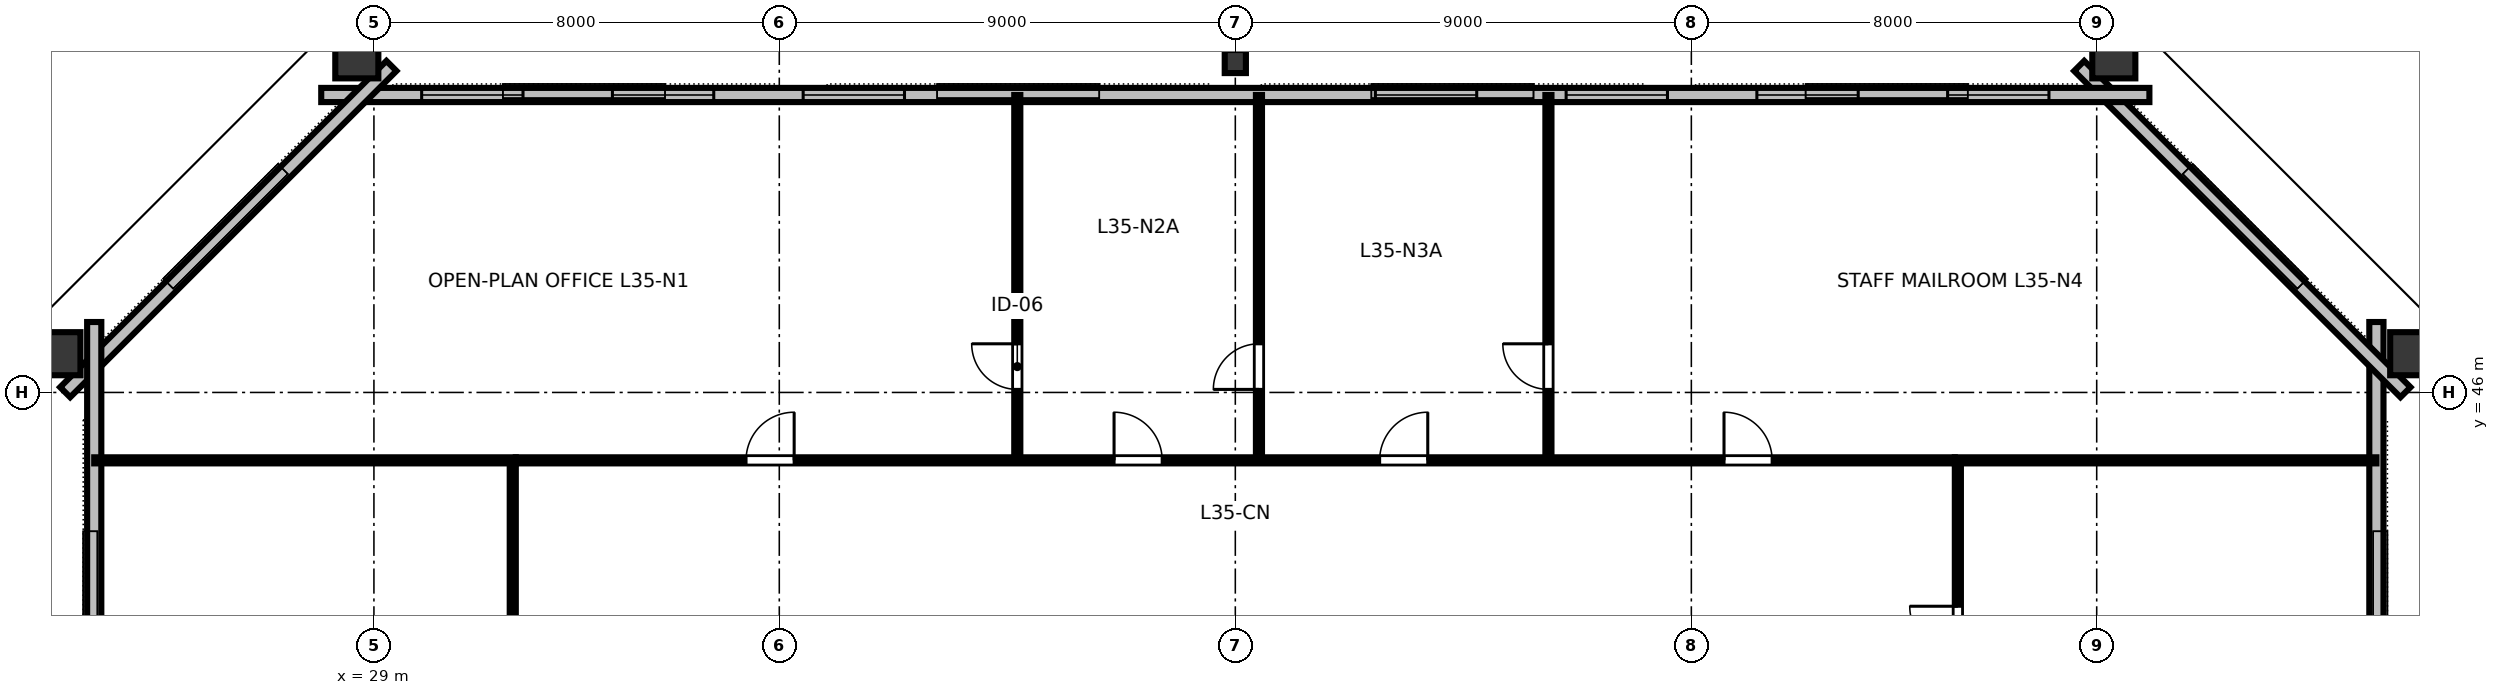
"""IFC4 building model, lengths in metres.
Left out: names, types, materials, properties, quantities, classifications, styles, units other than length and angle.
Written with IfcOpenShell. Run it as: python <this file> out.ifc"""

import sys

from ifc_helpers import new_model, si_unit, direction, frame, frame_2d, origin, origin_2d, place, context, subcontext, project, spatial, rectangle, hollow_rectangle, i_section, extrude, element, fill, save


model = new_model("IFC4")
c1 = context("Model", 3, precision=1e-05, world=origin(), true_north=direction((0.0, 1.0)))
c2 = subcontext(c1, "Body", "Model", "MODEL_VIEW")
j1 = project(units=[si_unit("LENGTHUNIT", "METRE"), si_unit("PLANEANGLEUNIT", "RADIAN")], contexts=[c1])
p1 = place(None, origin())
s1 = spatial("IfcSite", under=j1, at=p1, CompositionType="ELEMENT")
p2 = place(p1, origin())
s2 = spatial("IfcBuilding", under=s1, at=p2, CompositionType="ELEMENT")
p3 = place(p2, frame((0.0, 0.0, 134.8)))
s3 = spatial("IfcBuildingStorey", under=s2, at=p3, CompositionType="ELEMENT", Elevation=134.8)
p4 = place(p3, frame((69.292, 46.764, 0.0), z_axis=(0.088696892927, 0.044710179306, 0.995054702542), x_axis=(-0.88854975077, -0.447898650878, 0.099328439777)))
e1 = element("IfcColumn", 1, at=p4, inside=s3, PredefinedType="COLUMN", context=c2, shape_type="SweptSolid", body=[
    extrude(hollow_rectangle(XDim=0.85, YDim=1.0, WallThickness=0.05, at=origin_2d()), origin(), (0.0, 0.0, 1.0), 3.375),
])
p5 = place(p3, frame((63.338, 52.698, 0.0), z_axis=(0.059349667623, 0.074114706886, 0.995482107914), x_axis=(-0.780571247111, 0.625066818975, 0.0)))
e2 = element("IfcColumn", 2, at=p5, inside=s3, PredefinedType="COLUMN", context=c2, shape_type="SweptSolid", body=[
    extrude(hollow_rectangle(XDim=0.85, YDim=1.0, WallThickness=0.05, at=origin_2d()), origin(), (0.0, 0.0, 1.0), 3.373),
])
p6 = place(p3, frame((46.0, 52.53, 0.0), z_axis=(0.0, 0.074245582927, 0.997239987874), x_axis=(-1.0, 0.0, 0.0)))
e3 = element("IfcColumn", 3, at=p6, inside=s3, PredefinedType="COLUMN", context=c2, shape_type="SweptSolid", body=[
    extrude(i_section(OverallWidth=0.418, OverallDepth=0.455, WebThickness=0.042, FlangeThickness=0.068, FilletRadius=0.025, at=origin_2d()), origin(), (0.0, 0.0, 1.0), 3.367),
])
p7 = place(p3, frame((28.662, 52.698, 0.0), z_axis=(-0.059349667623, 0.074114706886, 0.995482107914), x_axis=(-0.780571247111, -0.625066818975, 0.0)))
e4 = element("IfcColumn", 4, at=p7, inside=s3, PredefinedType="COLUMN", context=c2, shape_type="SweptSolid", body=[
    extrude(hollow_rectangle(XDim=0.85, YDim=1.0, WallThickness=0.05, at=origin_2d()), origin(), (0.0, 0.0, 1.0), 3.373),
])
p8 = place(p3, frame((22.708, 46.764, 0.0), z_axis=(-0.088696892927, 0.044710179306, 0.995054702542), x_axis=(0.88854975077, -0.447898650878, 0.099328439777)))
e5 = element("IfcColumn", 5, at=p8, inside=s3, PredefinedType="COLUMN", context=c2, shape_type="SweptSolid", body=[
    extrude(hollow_rectangle(XDim=0.85, YDim=1.0, WallThickness=0.05, at=origin_2d()), origin(), (0.0, 0.0, 1.0), 3.375),
])
p9 = place(p3, frame((68.52, 16.61, 0.0), z_axis=(0.0, 0.0, 1.0), x_axis=(0.0, 1.0, 0.0)))
e6 = element("IfcWall", 6, at=p9, inside=s3, PredefinedType="STANDARD", context=c2, shape_type="SweptSolid", body=[
    extrude(rectangle(XDim=30.78, YDim=0.28, at=frame_2d((15.39, 0.0))), origin(), (0.0, 0.0, 1.0), 3.36),
])
p10 = place(p9, frame((6.224, 0.0, 0.8)))
e7 = element("IfcOpeningElement", 7, at=p10, cuts=e6, PredefinedType="OPENING", context=c2, shape_type="SweptSolid", body=[
    extrude(rectangle(XDim=2.0, YDim=1.95, at=frame_2d((1.0, 0.975))), frame((0.0, 0.15, 0.0), z_axis=(0.0, -1.0, 0.0), x_axis=(1.0, 0.0, 0.0)), (0.0, 0.0, 1.0), 0.3),
])
p11 = place(p9, frame((18.473, 0.0, 0.8)))
e8 = element("IfcOpeningElement", 8, at=p11, cuts=e6, PredefinedType="OPENING", context=c2, shape_type="SweptSolid", body=[
    extrude(rectangle(XDim=2.0, YDim=1.95, at=frame_2d((1.0, 0.975))), frame((0.0, 0.15, 0.0), z_axis=(0.0, -1.0, 0.0), x_axis=(1.0, 0.0, 0.0)), (0.0, 0.0, 1.0), 0.3),
])
p12 = place(p9, frame((22.556, 0.0, 0.8)))
e9 = element("IfcOpeningElement", 9, at=p12, cuts=e6, PredefinedType="OPENING", context=c2, shape_type="SweptSolid", body=[
    extrude(rectangle(XDim=2.0, YDim=1.95, at=frame_2d((1.0, 0.975))), frame((0.0, 0.15, 0.0), z_axis=(0.0, -1.0, 0.0), x_axis=(1.0, 0.0, 0.0)), (0.0, 0.0, 1.0), 0.3),
])
p13 = place(p3, frame((69.094, 46.004, 0.0), z_axis=(0.0, 0.0, 1.0), x_axis=(-0.707106781187, 0.707106781187, 0.0)))
e10 = element("IfcWall", 10, at=p13, inside=s3, PredefinedType="STANDARD", context=c2, shape_type="SweptSolid", body=[
    extrude(rectangle(XDim=9.107, YDim=0.28, at=frame_2d((4.553, 0.0))), origin(), (0.0, 0.0, 1.0), 3.36),
])
p14 = place(p3, frame((64.04, 51.87, 0.0), z_axis=(0.0, 0.0, 1.0), x_axis=(-1.0, 0.0, 0.0)))
e11 = element("IfcWall", 11, at=p14, inside=s3, PredefinedType="STANDARD", context=c2, shape_type="SweptSolid", body=[
    extrude(rectangle(XDim=36.08, YDim=0.28, at=frame_2d((18.04, 0.0))), origin(), (0.0, 0.0, 1.0), 3.36),
])
p15 = place(p14, frame((1.982, 0.0, 0.8)))
e12 = element("IfcOpeningElement", 12, at=p15, cuts=e11, PredefinedType="OPENING", context=c2, shape_type="SweptSolid", body=[
    extrude(rectangle(XDim=2.0, YDim=1.95, at=frame_2d((1.0, 0.975))), frame((0.0, 0.15, 0.0), z_axis=(0.0, -1.0, 0.0), x_axis=(1.0, 0.0, 0.0)), (0.0, 0.0, 1.0), 0.3),
])
p16 = place(p14, frame((5.747, 0.0, 0.8)))
e13 = element("IfcOpeningElement", 13, at=p16, cuts=e11, PredefinedType="OPENING", context=c2, shape_type="SweptSolid", body=[
    extrude(rectangle(XDim=2.0, YDim=1.95, at=frame_2d((1.0, 0.975))), frame((0.0, 0.15, 0.0), z_axis=(0.0, -1.0, 0.0), x_axis=(1.0, 0.0, 0.0)), (0.0, 0.0, 1.0), 0.3),
])
p17 = place(p14, frame((9.511, 0.0, 0.8)))
e14 = element("IfcOpeningElement", 14, at=p17, cuts=e11, PredefinedType="OPENING", context=c2, shape_type="SweptSolid", body=[
    extrude(rectangle(XDim=2.0, YDim=1.95, at=frame_2d((1.0, 0.975))), frame((0.0, 0.15, 0.0), z_axis=(0.0, -1.0, 0.0), x_axis=(1.0, 0.0, 0.0)), (0.0, 0.0, 1.0), 0.3),
])
p18 = place(p14, frame((13.276, 0.0, 0.8)))
e15 = element("IfcOpeningElement", 15, at=p18, cuts=e11, PredefinedType="OPENING", context=c2, shape_type="SweptSolid", body=[
    extrude(rectangle(XDim=2.0, YDim=1.95, at=frame_2d((1.0, 0.975))), frame((0.0, 0.15, 0.0), z_axis=(0.0, -1.0, 0.0), x_axis=(1.0, 0.0, 0.0)), (0.0, 0.0, 1.0), 0.3),
])
p19 = place(p14, frame((24.569, 0.0, 0.8)))
e16 = element("IfcOpeningElement", 16, at=p19, cuts=e11, PredefinedType="OPENING", context=c2, shape_type="SweptSolid", body=[
    extrude(rectangle(XDim=2.0, YDim=1.95, at=frame_2d((1.0, 0.975))), frame((0.0, 0.15, 0.0), z_axis=(0.0, -1.0, 0.0), x_axis=(1.0, 0.0, 0.0)), (0.0, 0.0, 1.0), 0.3),
])
p20 = place(p14, frame((28.333, 0.0, 0.8)))
e17 = element("IfcOpeningElement", 17, at=p20, cuts=e11, PredefinedType="OPENING", context=c2, shape_type="SweptSolid", body=[
    extrude(rectangle(XDim=2.0, YDim=1.95, at=frame_2d((1.0, 0.975))), frame((0.0, 0.15, 0.0), z_axis=(0.0, -1.0, 0.0), x_axis=(1.0, 0.0, 0.0)), (0.0, 0.0, 1.0), 0.3),
])
p21 = place(p14, frame((32.098, 0.0, 0.8)))
e18 = element("IfcOpeningElement", 18, at=p21, cuts=e11, PredefinedType="OPENING", context=c2, shape_type="SweptSolid", body=[
    extrude(rectangle(XDim=2.0, YDim=1.95, at=frame_2d((1.0, 0.975))), frame((0.0, 0.15, 0.0), z_axis=(0.0, -1.0, 0.0), x_axis=(1.0, 0.0, 0.0)), (0.0, 0.0, 1.0), 0.3),
])
p22 = place(p3, frame((29.345, 52.444, 0.0), z_axis=(0.0, 0.0, 1.0), x_axis=(-0.707106781187, -0.707106781187, 0.0)))
e19 = element("IfcWall", 19, at=p22, inside=s3, PredefinedType="STANDARD", context=c2, shape_type="SweptSolid", body=[
    extrude(rectangle(XDim=9.107, YDim=0.28, at=frame_2d((4.553, 0.0))), origin(), (0.0, 0.0, 1.0), 3.36),
])
p23 = place(p3, frame((23.48, 47.39, 0.0), z_axis=(0.0, 0.0, 1.0), x_axis=(0.0, -1.0, 0.0)))
e20 = element("IfcWall", 20, at=p23, inside=s3, PredefinedType="STANDARD", context=c2, shape_type="SweptSolid", body=[
    extrude(rectangle(XDim=30.78, YDim=0.28, at=frame_2d((15.39, 0.0))), origin(), (0.0, 0.0, 1.0), 3.36),
])
p24 = place(p23, frame((6.224, 0.0, 0.8)))
e21 = element("IfcOpeningElement", 21, at=p24, cuts=e20, PredefinedType="OPENING", context=c2, shape_type="SweptSolid", body=[
    extrude(rectangle(XDim=2.0, YDim=1.95, at=frame_2d((1.0, 0.975))), frame((0.0, 0.15, 0.0), z_axis=(0.0, -1.0, 0.0), x_axis=(1.0, 0.0, 0.0)), (0.0, 0.0, 1.0), 0.3),
])
p25 = place(p23, frame((10.307, 0.0, 0.8)))
e22 = element("IfcOpeningElement", 22, at=p25, cuts=e20, PredefinedType="OPENING", context=c2, shape_type="SweptSolid", body=[
    extrude(rectangle(XDim=2.0, YDim=1.95, at=frame_2d((1.0, 0.975))), frame((0.0, 0.15, 0.0), z_axis=(0.0, -1.0, 0.0), x_axis=(1.0, 0.0, 0.0)), (0.0, 0.0, 1.0), 0.3),
])
p26 = place(p23, frame((18.473, 0.0, 0.8)))
e23 = element("IfcOpeningElement", 23, at=p26, cuts=e20, PredefinedType="OPENING", context=c2, shape_type="SweptSolid", body=[
    extrude(rectangle(XDim=2.0, YDim=1.95, at=frame_2d((1.0, 0.975))), frame((0.0, 0.15, 0.0), z_axis=(0.0, -1.0, 0.0), x_axis=(1.0, 0.0, 0.0)), (0.0, 0.0, 1.0), 0.3),
])
p27 = place(p23, frame((22.556, 0.0, 0.8)))
e24 = element("IfcOpeningElement", 24, at=p27, cuts=e20, PredefinedType="OPENING", context=c2, shape_type="SweptSolid", body=[
    extrude(rectangle(XDim=2.0, YDim=1.95, at=frame_2d((1.0, 0.975))), frame((0.0, 0.15, 0.0), z_axis=(0.0, -1.0, 0.0), x_axis=(1.0, 0.0, 0.0)), (0.0, 0.0, 1.0), 0.3),
])
p28 = place(p3, frame((41.697, 44.66, 0.0), z_axis=(0.0, 0.0, 1.0), x_axis=(0.0, 1.0, 0.0)))
e25 = element("IfcWall", 25, at=p28, inside=s3, PredefinedType="PARTITIONING", context=c2, shape_type="SweptSolid", body=[
    extrude(rectangle(XDim=7.21, YDim=0.12, at=frame_2d((3.605, 0.0))), origin(), (0.0, 0.0, 1.0), 2.64),
])
p29 = place(p28, frame((1.4, 0.0, 0.0)))
e26 = element("IfcOpeningElement", 26, at=p29, cuts=e25, PredefinedType="OPENING", context=c2, shape_type="SweptSolid", body=[
    extrude(rectangle(XDim=0.9, YDim=2.15, at=frame_2d((0.45, 1.075))), frame((0.0, 0.07, 0.0), z_axis=(0.0, -1.0, 0.0), x_axis=(1.0, 0.0, 0.0)), (0.0, 0.0, 1.0), 0.14),
])
p30 = place(p3, frame((46.467, 44.66, 0.0), z_axis=(0.0, 0.0, 1.0), x_axis=(0.0, 1.0, 0.0)))
e27 = element("IfcWall", 27, at=p30, inside=s3, PredefinedType="PARTITIONING", context=c2, shape_type="SweptSolid", body=[
    extrude(rectangle(XDim=7.21, YDim=0.12, at=frame_2d((3.605, 0.0))), origin(), (0.0, 0.0, 1.0), 2.64),
])
p31 = place(p30, frame((1.4, 0.0, 0.0)))
e28 = element("IfcOpeningElement", 28, at=p31, cuts=e27, PredefinedType="OPENING", context=c2, shape_type="SweptSolid", body=[
    extrude(rectangle(XDim=0.9, YDim=2.15, at=frame_2d((0.45, 1.075))), frame((0.0, 0.07, 0.0), z_axis=(0.0, -1.0, 0.0), x_axis=(1.0, 0.0, 0.0)), (0.0, 0.0, 1.0), 0.14),
])
p32 = place(p3, frame((52.179, 44.66, 0.0), z_axis=(0.0, 0.0, 1.0), x_axis=(0.0, 1.0, 0.0)))
e29 = element("IfcWall", 29, at=p32, inside=s3, PredefinedType="PARTITIONING", context=c2, shape_type="SweptSolid", body=[
    extrude(rectangle(XDim=7.21, YDim=0.12, at=frame_2d((3.605, 0.0))), origin(), (0.0, 0.0, 1.0), 2.64),
])
p33 = place(p32, frame((1.4, 0.0, 0.0)))
e30 = element("IfcOpeningElement", 30, at=p33, cuts=e29, PredefinedType="OPENING", context=c2, shape_type="SweptSolid", body=[
    extrude(rectangle(XDim=0.9, YDim=2.15, at=frame_2d((0.45, 1.075))), frame((0.0, 0.07, 0.0), z_axis=(0.0, -1.0, 0.0), x_axis=(1.0, 0.0, 0.0)), (0.0, 0.0, 1.0), 0.14),
])
p34 = place(p3, frame((31.8, 44.66, 0.0), z_axis=(0.0, 0.0, 1.0), x_axis=(1.0, 0.0, 0.0)))
e31 = element("IfcWall", 31, at=p34, inside=s3, PredefinedType="PARTITIONING", context=c2, shape_type="SweptSolid", body=[
    extrude(rectangle(XDim=28.4, YDim=0.12, at=frame_2d((14.2, 0.0))), origin(), (0.0, 0.0, 1.0), 2.64),
])
p35 = place(p34, frame((4.544, 0.0, 0.0)))
e32 = element("IfcOpeningElement", 32, at=p35, cuts=e31, PredefinedType="OPENING", context=c2, shape_type="SweptSolid", body=[
    extrude(rectangle(XDim=0.95, YDim=2.15, at=frame_2d((0.475, 1.075))), frame((0.0, 0.07, 0.0), z_axis=(0.0, -1.0, 0.0), x_axis=(1.0, 0.0, 0.0)), (0.0, 0.0, 1.0), 0.14),
])
p36 = place(p34, frame((11.807, 0.0, 0.0)))
e33 = element("IfcOpeningElement", 33, at=p36, cuts=e31, PredefinedType="OPENING", context=c2, shape_type="SweptSolid", body=[
    extrude(rectangle(XDim=0.95, YDim=2.15, at=frame_2d((0.475, 1.075))), frame((0.0, 0.07, 0.0), z_axis=(0.0, -1.0, 0.0), x_axis=(1.0, 0.0, 0.0)), (0.0, 0.0, 1.0), 0.14),
])
p37 = place(p34, frame((17.048, 0.0, 0.0)))
e34 = element("IfcOpeningElement", 34, at=p37, cuts=e31, PredefinedType="OPENING", context=c2, shape_type="SweptSolid", body=[
    extrude(rectangle(XDim=0.95, YDim=2.15, at=frame_2d((0.475, 1.075))), frame((0.0, 0.07, 0.0), z_axis=(0.0, -1.0, 0.0), x_axis=(1.0, 0.0, 0.0)), (0.0, 0.0, 1.0), 0.14),
])
p38 = place(p34, frame((23.845, 0.0, 0.0)))
e35 = element("IfcOpeningElement", 35, at=p38, cuts=e31, PredefinedType="OPENING", context=c2, shape_type="SweptSolid", body=[
    extrude(rectangle(XDim=0.95, YDim=2.15, at=frame_2d((0.475, 1.075))), frame((0.0, 0.07, 0.0), z_axis=(0.0, -1.0, 0.0), x_axis=(1.0, 0.0, 0.0)), (0.0, 0.0, 1.0), 0.14),
])
p39 = place(p3, frame((31.74, 33.02, 0.0), z_axis=(0.0, 0.0, 1.0), x_axis=(0.0, 1.0, 0.0)))
e36 = element("IfcWall", 36, at=p39, inside=s3, PredefinedType="PARTITIONING", context=c2, shape_type="SweptSolid", body=[
    extrude(rectangle(XDim=11.58, YDim=0.12, at=frame_2d((5.79, 0.0))), origin(), (0.0, 0.0, 1.0), 2.64),
])
p40 = place(p39, frame((5.215, 0.0, 0.0)))
e37 = element("IfcOpeningElement", 37, at=p40, cuts=e36, PredefinedType="OPENING", context=c2, shape_type="SweptSolid", body=[
    extrude(rectangle(XDim=0.95, YDim=2.15, at=frame_2d((0.475, 1.075))), frame((0.0, 0.07, 0.0), z_axis=(0.0, -1.0, 0.0), x_axis=(1.0, 0.0, 0.0)), (0.0, 0.0, 1.0), 0.14),
])
p41 = place(p3, frame((60.26, 33.02, 0.0), z_axis=(0.0, 0.0, 1.0), x_axis=(0.0, 1.0, 0.0)))
e38 = element("IfcWall", 38, at=p41, inside=s3, PredefinedType="PARTITIONING", context=c2, shape_type="SweptSolid", body=[
    extrude(rectangle(XDim=11.58, YDim=0.12, at=frame_2d((5.79, 0.0))), origin(), (0.0, 0.0, 1.0), 2.64),
])
p42 = place(p41, frame((2.121, 0.0, 0.0)))
e39 = element("IfcOpeningElement", 39, at=p42, cuts=e38, PredefinedType="OPENING", context=c2, shape_type="SweptSolid", body=[
    extrude(rectangle(XDim=0.95, YDim=2.15, at=frame_2d((0.475, 1.075))), frame((0.0, 0.07, 0.0), z_axis=(0.0, -1.0, 0.0), x_axis=(1.0, 0.0, 0.0)), (0.0, 0.0, 1.0), 0.14),
])
p43 = place(p41, frame((7.811, 0.0, 0.0)))
e40 = element("IfcOpeningElement", 40, at=p43, cuts=e38, PredefinedType="OPENING", context=c2, shape_type="SweptSolid", body=[
    extrude(rectangle(XDim=0.95, YDim=2.15, at=frame_2d((0.475, 1.075))), frame((0.0, 0.07, 0.0), z_axis=(0.0, -1.0, 0.0), x_axis=(1.0, 0.0, 0.0)), (0.0, 0.0, 1.0), 0.14),
])
for number, where, z_axis, x_axis in (
    (41, (31.8, 44.66, 0.0), (0.0, 0.0, 1.0), (-1.0, 0.0, 0.0)),
    (42, (60.2, 44.66, 0.0), (0.0, 0.0, 1.0), (1.0, 0.0, 0.0)),
):
    element("IfcWall", number, at=place(p3, frame(where, z_axis=z_axis, x_axis=x_axis)), inside=s3, PredefinedType="PARTITIONING", context=c2, shape_type="SweptSolid", body=[
        extrude(rectangle(XDim=8.32, YDim=0.12, at=frame_2d((4.16, 0.0))), origin(), (0.0, 0.0, 1.0), 2.64),
    ])
p44 = place(p15, origin())
e43 = element("IfcWindow", 43, at=p44, inside=s3, PartitioningType="SINGLE_PANEL", PredefinedType="WINDOW", context=c2, shape_type="SweptSolid", body=[
    extrude(rectangle(XDim=2.0, YDim=1.95, at=frame_2d((1.0, 0.975))), frame((0.0, 0.03, 0.0), z_axis=(0.0, -1.0, 0.0), x_axis=(1.0, 0.0, 0.0)), (0.0, 0.0, 1.0), 0.06),
])
fill(e12, e43)
p45 = place(p16, origin())
e44 = element("IfcWindow", 44, at=p45, inside=s3, PartitioningType="SINGLE_PANEL", PredefinedType="WINDOW", context=c2, shape_type="SweptSolid", body=[
    extrude(rectangle(XDim=2.0, YDim=1.95, at=frame_2d((1.0, 0.975))), frame((0.0, 0.03, 0.0), z_axis=(0.0, -1.0, 0.0), x_axis=(1.0, 0.0, 0.0)), (0.0, 0.0, 1.0), 0.06),
])
fill(e13, e44)
p46 = place(p17, origin())
e45 = element("IfcWindow", 45, at=p46, inside=s3, PartitioningType="SINGLE_PANEL", PredefinedType="WINDOW", context=c2, shape_type="SweptSolid", body=[
    extrude(rectangle(XDim=2.0, YDim=1.95, at=frame_2d((1.0, 0.975))), frame((0.0, 0.03, 0.0), z_axis=(0.0, -1.0, 0.0), x_axis=(1.0, 0.0, 0.0)), (0.0, 0.0, 1.0), 0.06),
])
fill(e14, e45)
p47 = place(p18, origin())
e46 = element("IfcWindow", 46, at=p47, inside=s3, PartitioningType="SINGLE_PANEL", PredefinedType="WINDOW", context=c2, shape_type="SweptSolid", body=[
    extrude(rectangle(XDim=2.0, YDim=1.95, at=frame_2d((1.0, 0.975))), frame((0.0, 0.03, 0.0), z_axis=(0.0, -1.0, 0.0), x_axis=(1.0, 0.0, 0.0)), (0.0, 0.0, 1.0), 0.06),
])
fill(e15, e46)
p48 = place(p19, origin())
e47 = element("IfcWindow", 47, at=p48, inside=s3, PartitioningType="SINGLE_PANEL", PredefinedType="WINDOW", context=c2, shape_type="SweptSolid", body=[
    extrude(rectangle(XDim=2.0, YDim=1.95, at=frame_2d((1.0, 0.975))), frame((0.0, 0.03, 0.0), z_axis=(0.0, -1.0, 0.0), x_axis=(1.0, 0.0, 0.0)), (0.0, 0.0, 1.0), 0.06),
])
fill(e16, e47)
p49 = place(p20, origin())
e48 = element("IfcWindow", 48, at=p49, inside=s3, PartitioningType="SINGLE_PANEL", PredefinedType="WINDOW", context=c2, shape_type="SweptSolid", body=[
    extrude(rectangle(XDim=2.0, YDim=1.95, at=frame_2d((1.0, 0.975))), frame((0.0, 0.03, 0.0), z_axis=(0.0, -1.0, 0.0), x_axis=(1.0, 0.0, 0.0)), (0.0, 0.0, 1.0), 0.06),
])
fill(e17, e48)
p50 = place(p21, origin())
e49 = element("IfcWindow", 49, at=p50, inside=s3, PartitioningType="SINGLE_PANEL", PredefinedType="WINDOW", context=c2, shape_type="SweptSolid", body=[
    extrude(rectangle(XDim=2.0, YDim=1.95, at=frame_2d((1.0, 0.975))), frame((0.0, 0.03, 0.0), z_axis=(0.0, -1.0, 0.0), x_axis=(1.0, 0.0, 0.0)), (0.0, 0.0, 1.0), 0.06),
])
fill(e18, e49)
p51 = place(p29, origin())
e50 = element("IfcDoor", 50, at=p51, inside=s3, OperationType="SINGLE_SWING_RIGHT", PredefinedType="DOOR", context=c2, shape_type="SweptSolid", body=[
    extrude(rectangle(XDim=0.9, YDim=2.15, at=frame_2d((0.45, 1.075))), frame((0.0, 0.025, 0.0), z_axis=(0.0, -1.0, 0.0), x_axis=(1.0, 0.0, 0.0)), (0.0, 0.0, 1.0), 0.05),
])
fill(e26, e50)
p52 = place(p31, origin())
e51 = element("IfcDoor", 51, at=p52, inside=s3, OperationType="SINGLE_SWING_LEFT", PredefinedType="DOOR", context=c2, shape_type="SweptSolid", body=[
    extrude(rectangle(XDim=0.9, YDim=2.15, at=frame_2d((0.45, 1.075))), frame((0.0, 0.025, 0.0), z_axis=(0.0, -1.0, 0.0), x_axis=(1.0, 0.0, 0.0)), (0.0, 0.0, 1.0), 0.05),
])
fill(e28, e51)
p53 = place(p33, origin())
e52 = element("IfcDoor", 52, at=p53, inside=s3, OperationType="SINGLE_SWING_RIGHT", PredefinedType="DOOR", context=c2, shape_type="SweptSolid", body=[
    extrude(rectangle(XDim=0.9, YDim=2.15, at=frame_2d((0.45, 1.075))), frame((0.0, 0.025, 0.0), z_axis=(0.0, -1.0, 0.0), x_axis=(1.0, 0.0, 0.0)), (0.0, 0.0, 1.0), 0.05),
])
fill(e30, e52)
p54 = place(p35, origin())
e53 = element("IfcDoor", 53, at=p54, inside=s3, OperationType="SINGLE_SWING_RIGHT", PredefinedType="DOOR", context=c2, shape_type="SweptSolid", body=[
    extrude(rectangle(XDim=0.95, YDim=2.15, at=frame_2d((0.475, 1.075))), frame((0.0, 0.025, 0.0), z_axis=(0.0, -1.0, 0.0), x_axis=(1.0, 0.0, 0.0)), (0.0, 0.0, 1.0), 0.05),
])
fill(e32, e53)
p55 = place(p36, origin())
e54 = element("IfcDoor", 54, at=p55, inside=s3, OperationType="SINGLE_SWING_LEFT", PredefinedType="DOOR", context=c2, shape_type="SweptSolid", body=[
    extrude(rectangle(XDim=0.95, YDim=2.15, at=frame_2d((0.475, 1.075))), frame((0.0, 0.025, 0.0), z_axis=(0.0, -1.0, 0.0), x_axis=(1.0, 0.0, 0.0)), (0.0, 0.0, 1.0), 0.05),
])
fill(e33, e54)
p56 = place(p37, origin())
e55 = element("IfcDoor", 55, at=p56, inside=s3, OperationType="SINGLE_SWING_RIGHT", PredefinedType="DOOR", context=c2, shape_type="SweptSolid", body=[
    extrude(rectangle(XDim=0.95, YDim=2.15, at=frame_2d((0.475, 1.075))), frame((0.0, 0.025, 0.0), z_axis=(0.0, -1.0, 0.0), x_axis=(1.0, 0.0, 0.0)), (0.0, 0.0, 1.0), 0.05),
])
fill(e34, e55)
p57 = place(p38, origin())
e56 = element("IfcDoor", 56, at=p57, inside=s3, OperationType="SINGLE_SWING_LEFT", PredefinedType="DOOR", context=c2, shape_type="SweptSolid", body=[
    extrude(rectangle(XDim=0.95, YDim=2.15, at=frame_2d((0.475, 1.075))), frame((0.0, 0.025, 0.0), z_axis=(0.0, -1.0, 0.0), x_axis=(1.0, 0.0, 0.0)), (0.0, 0.0, 1.0), 0.05),
])
fill(e35, e56)
p58 = place(p43, origin())
e57 = element("IfcDoor", 57, at=p58, inside=s3, OperationType="SINGLE_SWING_RIGHT", PredefinedType="DOOR", context=c2, shape_type="SweptSolid", body=[
    extrude(rectangle(XDim=0.95, YDim=2.15, at=frame_2d((0.475, 1.075))), frame((0.0, 0.025, 0.0), z_axis=(0.0, -1.0, 0.0), x_axis=(1.0, 0.0, 0.0)), (0.0, 0.0, 1.0), 0.05),
])
fill(e40, e57)
save(model, sys.argv[1])
